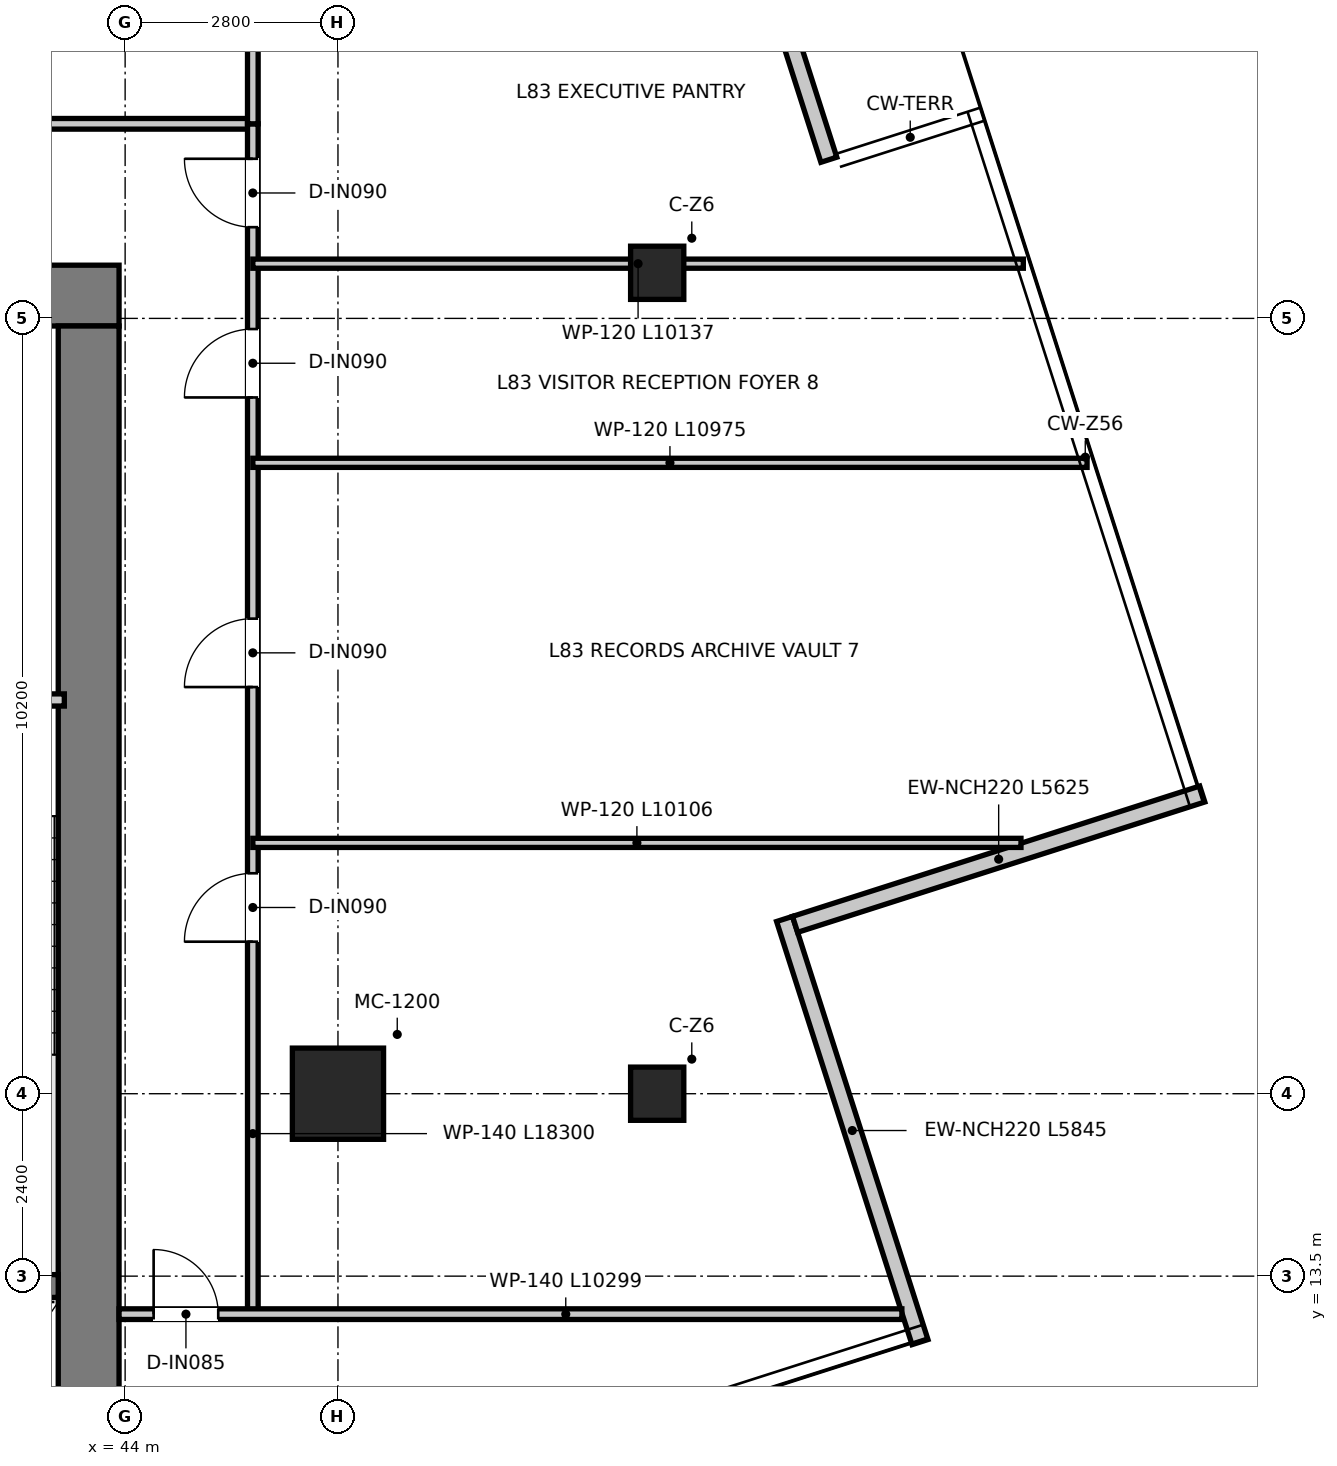
"""IFC4 building model, lengths in metres.
Left out: names, types, materials, properties, quantities, classifications, styles, units other than length and angle.
Written with IfcOpenShell. Run it as: python <this file> out.ifc"""

import sys

from ifc_helpers import new_model, si_unit, direction, frame, frame_2d, origin, origin_2d, place, context, subcontext, project, spatial, rectangle, extrude, source, transform, mapped, element, fill, save


model = new_model("IFC4")
c1 = context("Model", 3, precision=1e-05, world=origin(), true_north=direction((0.0, 1.0)))
c2 = subcontext(c1, "Body", "Model", "MODEL_VIEW")
j1 = project(units=[si_unit("LENGTHUNIT", "METRE"), si_unit("PLANEANGLEUNIT", "RADIAN")], contexts=[c1])
p1 = place(None, origin())
s1 = spatial("IfcSite", under=j1, at=p1, CompositionType="ELEMENT")
p2 = place(p1, origin())
s2 = spatial("IfcBuilding", under=s1, at=p2, CompositionType="ELEMENT")
p3 = place(p2, frame((0.0, 0.0, 339.55)))
s3 = spatial("IfcBuildingStorey", under=s2, at=p3, CompositionType="ELEMENT", Elevation=339.55)
p4 = place(p3, frame((28.08, 26.4, 0.0), z_axis=(0.0, 0.0, 1.0), x_axis=(1.0, 0.0, 0.0)))
e1 = element("IfcWall", 1, at=p4, inside=s3, PredefinedType="SHEAR", context=c2, shape_type="SweptSolid", body=[
    extrude(rectangle(XDim=15.84, YDim=0.8, at=frame_2d((7.92, 0.0))), origin(), (0.0, 0.0, 1.0), 3.95),
])
p5 = place(p4, frame((7.22, 0.0, 0.0)))
e2 = element("IfcOpeningElement", 2, at=p5, cuts=e1, PredefinedType="OPENING", context=c2, shape_type="SweptSolid", body=[
    extrude(rectangle(XDim=1.4, YDim=2.2, at=frame_2d((0.7, 1.1))), frame((0.0, 0.41, 0.0), z_axis=(0.0, -1.0, 0.0), x_axis=(1.0, 0.0, 0.0)), (0.0, 0.0, 1.0), 0.82),
])
p6 = place(p4, frame((1.775, 0.0, 0.0)))
e3 = element("IfcOpeningElement", 3, at=p6, cuts=e1, PredefinedType="OPENING", context=c2, shape_type="SweptSolid", body=[
    extrude(rectangle(XDim=1.05, YDim=2.1, at=frame_2d((0.525, 1.05))), frame((0.0, 0.41, 0.0), z_axis=(0.0, -1.0, 0.0), x_axis=(1.0, 0.0, 0.0)), (0.0, 0.0, 1.0), 0.82),
])
p7 = place(p4, frame((13.015, 0.0, 0.0)))
e4 = element("IfcOpeningElement", 4, at=p7, cuts=e1, PredefinedType="OPENING", context=c2, shape_type="SweptSolid", body=[
    extrude(rectangle(XDim=1.05, YDim=2.1, at=frame_2d((0.525, 1.05))), frame((0.0, 0.41, 0.0), z_axis=(0.0, -1.0, 0.0), x_axis=(1.0, 0.0, 0.0)), (0.0, 0.0, 1.0), 0.82),
])
p8 = place(p3, frame((43.52, 11.3, 0.0), z_axis=(0.0, 0.0, 1.0), x_axis=(0.0, 1.0, 0.0)))
e5 = element("IfcWall", 5, at=p8, inside=s3, PredefinedType="SHEAR", context=c2, shape_type="SweptSolid", body=[
    extrude(rectangle(XDim=14.7, YDim=0.8, at=frame_2d((7.35, 0.0))), origin(), (0.0, 0.0, 1.0), 3.95),
])
p9 = place(p3, frame((40.02, 13.37, 0.0), z_axis=(0.0, 0.0, 1.0), x_axis=(1.0, 0.0, 0.0)))
e6 = element("IfcWall", 6, at=p9, inside=s3, PredefinedType="SHEAR", context=c2, shape_type="SweptSolid", body=[
    extrude(rectangle(XDim=3.1, YDim=0.3, at=frame_2d((1.55, 0.0))), origin(), (0.0, 0.0, 1.0), 3.95),
])
m1 = source(origin(), c2, "Body", "SweptSolid", [
    extrude(rectangle(XDim=1.2, YDim=1.2, at=origin_2d()), origin(), (0.0, 0.0, 1.0), 3.95),
])
p10 = place(p3, frame((46.8, 15.9, 0.0), z_axis=(0.0, 0.0, 1.0), x_axis=(1.0, 0.0, 0.0)))
e7 = element("IfcColumn", 7, at=p10, inside=s3, PredefinedType="USERDEFINED", context=c2, shape_type="MappedRepresentation", body=[
    mapped(m1, transform((0.0, 0.0, 0.0), x_axis=(1.0, 0.0, 0.0), y_axis=(0.0, 1.0, 0.0), z_axis=(0.0, 0.0, 1.0), scale=1.0)),
])
m2 = source(origin(), c2, "Body", "SweptSolid", [
    extrude(rectangle(XDim=0.7, YDim=0.7, at=origin_2d()), origin(), (0.0, 0.0, 1.0), 3.95),
])
for number, where, z_axis, x_axis in (
    (8, (51.0, 26.7, 0.0), (0.0, 0.0, 1.0), (1.0, 0.0, 0.0)),
    (9, (51.0, 15.9, 0.0), (0.0, 0.0, 1.0), (1.0, 0.0, 0.0)),
):
    element("IfcColumn", number, at=place(p3, frame(where, z_axis=z_axis, x_axis=x_axis)), inside=s3, PredefinedType="COLUMN", context=c2, shape_type="MappedRepresentation", body=[
        mapped(m2, transform((0.0, 0.0, 0.0), x_axis=(1.0, 0.0, 0.0), y_axis=(0.0, 1.0, 0.0), z_axis=(0.0, 0.0, 1.0), scale=1.0)),
    ])
p11 = place(p3, frame((54.457, 12.632, 0.0), z_axis=(0.0, 0.0, 1.0), x_axis=(-0.304839382122, 0.952403775248, 0.0)))
e10 = element("IfcWall", 10, at=p11, inside=s3, PredefinedType="ELEMENTEDWALL", context=c2, shape_type="SweptSolid", body=[
    extrude(rectangle(XDim=5.845, YDim=0.22, at=frame_2d((2.922, 0.0))), origin(), (0.0, 0.0, 1.0), 3.67),
])
p12 = place(p3, frame((52.814, 18.128, 0.0), z_axis=(0.0, 0.0, 1.0), x_axis=(0.952395921602, 0.30486391803, 0.0)))
e11 = element("IfcWall", 11, at=p12, inside=s3, PredefinedType="ELEMENTEDWALL", context=c2, shape_type="SweptSolid", body=[
    extrude(rectangle(XDim=5.625, YDim=0.22, at=frame_2d((2.812, 0.0))), origin(), (0.0, 0.0, 1.0), 3.67),
])
p13 = place(p3, frame((50.914, 35.511, 0.0), z_axis=(0.0, 0.0, 1.0), x_axis=(0.304842539612, -0.952402764613, 0.0)))
e12 = element("IfcWall", 12, at=p13, inside=s3, PredefinedType="ELEMENTEDWALL", context=c2, shape_type="SweptSolid", body=[
    extrude(rectangle(XDim=7.69, YDim=0.22, at=frame_2d((3.845, 0.0))), origin(), (0.0, 0.0, 1.0), 3.38),
])
p14 = place(p13, frame((0.937, 0.0, 0.0)))
e13 = element("IfcOpeningElement", 13, at=p14, cuts=e12, PredefinedType="OPENING", context=c2, shape_type="SweptSolid", body=[
    extrude(rectangle(XDim=0.95, YDim=2.1, at=frame_2d((0.475, 1.05))), frame((0.0, 0.12, 0.0), z_axis=(0.0, -1.0, 0.0), x_axis=(1.0, 0.0, 0.0)), (0.0, 0.0, 1.0), 0.24),
])
p15 = place(p3, frame((40.04, 21.08, 0.0), z_axis=(0.0, 0.0, 1.0), x_axis=(1.0, 0.0, 0.0)))
e14 = element("IfcWall", 14, at=p15, inside=s3, PredefinedType="PARTITIONING", context=c2, shape_type="SweptSolid", body=[
    extrude(rectangle(XDim=3.16, YDim=0.16, at=frame_2d((1.58, 0.0))), origin(), (0.0, 0.0, 1.0), 3.67),
])
p16 = place(p15, frame((1.055, 0.0, 0.0)))
e15 = element("IfcOpeningElement", 15, at=p16, cuts=e14, PredefinedType="OPENING", context=c2, shape_type="SweptSolid", body=[
    extrude(rectangle(XDim=1.05, YDim=2.1, at=frame_2d((0.525, 1.05))), frame((0.0, 0.09, 0.0), z_axis=(0.0, -1.0, 0.0), x_axis=(1.0, 0.0, 0.0)), (0.0, 0.0, 1.0), 0.18),
])
p17 = place(p3, frame((26.32, 28.66, 0.0), z_axis=(0.0, 0.0, 1.0), x_axis=(1.0, 0.0, 0.0)))
e16 = element("IfcWall", 16, at=p17, inside=s3, PredefinedType="PARTITIONING", context=c2, shape_type="SweptSolid", body=[
    extrude(rectangle(XDim=19.36, YDim=0.14, at=frame_2d((9.68, 0.0))), origin(), (0.0, 0.0, 1.0), 3.18),
])
p18 = place(p17, frame((1.865, 0.0, 0.0)))
e17 = element("IfcOpeningElement", 17, at=p18, cuts=e16, PredefinedType="OPENING", context=c2, shape_type="SweptSolid", body=[
    extrude(rectangle(XDim=0.95, YDim=2.1, at=frame_2d((0.475, 1.05))), frame((0.0, 0.08, 0.0), z_axis=(0.0, -1.0, 0.0), x_axis=(1.0, 0.0, 0.0)), (0.0, 0.0, 1.0), 0.16),
])
p19 = place(p17, frame((8.205, 0.0, 0.0)))
e18 = element("IfcOpeningElement", 18, at=p19, cuts=e16, PredefinedType="OPENING", context=c2, shape_type="SweptSolid", body=[
    extrude(rectangle(XDim=0.95, YDim=2.1, at=frame_2d((0.475, 1.05))), frame((0.0, 0.08, 0.0), z_axis=(0.0, -1.0, 0.0), x_axis=(1.0, 0.0, 0.0)), (0.0, 0.0, 1.0), 0.16),
])
p20 = place(p17, frame((15.545, 0.0, 0.0)))
e19 = element("IfcOpeningElement", 19, at=p20, cuts=e16, PredefinedType="OPENING", context=c2, shape_type="SweptSolid", body=[
    extrude(rectangle(XDim=0.95, YDim=2.1, at=frame_2d((0.475, 1.05))), frame((0.0, 0.08, 0.0), z_axis=(0.0, -1.0, 0.0), x_axis=(1.0, 0.0, 0.0)), (0.0, 0.0, 1.0), 0.16),
])
p21 = place(p3, frame((45.68, 13.0, 0.0), z_axis=(0.0, 0.0, 1.0), x_axis=(0.0, 1.0, 0.0)))
e20 = element("IfcWall", 20, at=p21, inside=s3, PredefinedType="PARTITIONING", context=c2, shape_type="SweptSolid", body=[
    extrude(rectangle(XDim=15.66, YDim=0.14, at=frame_2d((7.83, 0.0))), origin(), (0.0, 0.0, 1.0), 3.13),
])
p22 = place(p21, frame((14.3, 0.0, 0.0)))
e21 = element("IfcOpeningElement", 21, at=p22, cuts=e20, PredefinedType="OPENING", context=c2, shape_type="SweptSolid", body=[
    extrude(rectangle(XDim=0.9, YDim=2.1, at=frame_2d((0.45, 1.05))), frame((0.0, 0.08, 0.0), z_axis=(0.0, -1.0, 0.0), x_axis=(1.0, 0.0, 0.0)), (0.0, 0.0, 1.0), 0.16),
])
p23 = place(p21, frame((4.9, 0.0, 0.0)))
e22 = element("IfcOpeningElement", 22, at=p23, cuts=e20, PredefinedType="OPENING", context=c2, shape_type="SweptSolid", body=[
    extrude(rectangle(XDim=0.9, YDim=2.1, at=frame_2d((0.45, 1.05))), frame((0.0, 0.08, 0.0), z_axis=(0.0, -1.0, 0.0), x_axis=(1.0, 0.0, 0.0)), (0.0, 0.0, 1.0), 0.16),
])
p24 = place(p21, frame((8.25, 0.0, 0.0)))
e23 = element("IfcOpeningElement", 23, at=p24, cuts=e20, PredefinedType="OPENING", context=c2, shape_type="SweptSolid", body=[
    extrude(rectangle(XDim=0.9, YDim=2.1, at=frame_2d((0.45, 1.05))), frame((0.0, 0.08, 0.0), z_axis=(0.0, -1.0, 0.0), x_axis=(1.0, 0.0, 0.0)), (0.0, 0.0, 1.0), 0.16),
])
p25 = place(p21, frame((12.06, 0.0, 0.0)))
e24 = element("IfcOpeningElement", 24, at=p25, cuts=e20, PredefinedType="OPENING", context=c2, shape_type="SweptSolid", body=[
    extrude(rectangle(XDim=0.9, YDim=2.1, at=frame_2d((0.45, 1.05))), frame((0.0, 0.08, 0.0), z_axis=(0.0, -1.0, 0.0), x_axis=(1.0, 0.0, 0.0)), (0.0, 0.0, 1.0), 0.16),
])
p26 = place(p3, frame((43.92, 13.0, 0.0), z_axis=(0.0, 0.0, 1.0), x_axis=(1.0, 0.0, 0.0)))
e25 = element("IfcWall", 25, at=p26, inside=s3, PredefinedType="PARTITIONING", context=c2, shape_type="SweptSolid", body=[
    extrude(rectangle(XDim=10.299, YDim=0.14, at=frame_2d((5.149, 0.0))), origin(), (0.0, 0.0, 1.0), 3.18),
])
p27 = place(p26, frame((0.455, 0.0, 0.0)))
e26 = element("IfcOpeningElement", 26, at=p27, cuts=e25, PredefinedType="OPENING", context=c2, shape_type="SweptSolid", body=[
    extrude(rectangle(XDim=0.85, YDim=2.1, at=frame_2d((0.425, 1.05))), frame((0.0, 0.08, 0.0), z_axis=(0.0, -1.0, 0.0), x_axis=(1.0, 0.0, 0.0)), (0.0, 0.0, 1.0), 0.16),
])
p28 = place(p3, frame((45.68, 26.82, 0.0), z_axis=(0.0, 0.0, 1.0), x_axis=(1.0, 0.0, 0.0)))
e27 = element("IfcWall", 27, at=p28, inside=s3, PredefinedType="PARTITIONING", context=c2, shape_type="SweptSolid", body=[
    extrude(rectangle(XDim=10.137, YDim=0.12, at=frame_2d((5.068, 0.0))), origin(), (0.0, 0.0, 1.0), 3.13),
])
p29 = place(p3, frame((45.68, 28.66, 0.0), z_axis=(0.0, 0.0, 1.0), x_axis=(0.0, 1.0, 0.0)))
e28 = element("IfcWall", 28, at=p29, inside=s3, PredefinedType="PARTITIONING", context=c2, shape_type="SweptSolid", body=[
    extrude(rectangle(XDim=2.64, YDim=0.14, at=frame_2d((1.32, 0.0))), origin(), (0.0, 0.0, 1.0), 3.43),
])
p30 = place(p3, frame((45.68, 19.2, 0.0), z_axis=(0.0, 0.0, 1.0), x_axis=(1.0, 0.0, 0.0)))
e29 = element("IfcWall", 29, at=p30, inside=s3, PredefinedType="PARTITIONING", context=c2, shape_type="SweptSolid", body=[
    extrude(rectangle(XDim=10.106, YDim=0.12, at=frame_2d((5.053, 0.0))), origin(), (0.0, 0.0, 1.0), 3.13),
])
p31 = place(p3, frame((45.68, 24.2, 0.0), z_axis=(0.0, 0.0, 1.0), x_axis=(1.0, 0.0, 0.0)))
e30 = element("IfcWall", 30, at=p31, inside=s3, PredefinedType="PARTITIONING", context=c2, shape_type="SweptSolid", body=[
    extrude(rectangle(XDim=10.976, YDim=0.12, at=frame_2d((5.488, 0.0))), origin(), (0.0, 0.0, 1.0), 3.13),
])
p32 = place(p22, origin())
e31 = element("IfcDoor", 31, at=p32, inside=s3, OperationType="SINGLE_SWING_RIGHT", PredefinedType="DOOR", context=c2, shape_type="SweptSolid", body=[
    extrude(rectangle(XDim=0.9, YDim=2.1, at=frame_2d((0.45, 1.05))), frame((0.0, 0.025, 0.0), z_axis=(0.0, -1.0, 0.0), x_axis=(1.0, 0.0, 0.0)), (0.0, 0.0, 1.0), 0.05),
])
fill(e21, e31)
p33 = place(p23, origin())
e32 = element("IfcDoor", 32, at=p33, inside=s3, OperationType="SINGLE_SWING_LEFT", PredefinedType="DOOR", context=c2, shape_type="SweptSolid", body=[
    extrude(rectangle(XDim=0.9, YDim=2.1, at=frame_2d((0.45, 1.05))), frame((0.0, 0.025, 0.0), z_axis=(0.0, -1.0, 0.0), x_axis=(1.0, 0.0, 0.0)), (0.0, 0.0, 1.0), 0.05),
])
fill(e22, e32)
p34 = place(p24, origin())
e33 = element("IfcDoor", 33, at=p34, inside=s3, OperationType="SINGLE_SWING_LEFT", PredefinedType="DOOR", context=c2, shape_type="SweptSolid", body=[
    extrude(rectangle(XDim=0.9, YDim=2.1, at=frame_2d((0.45, 1.05))), frame((0.0, 0.025, 0.0), z_axis=(0.0, -1.0, 0.0), x_axis=(1.0, 0.0, 0.0)), (0.0, 0.0, 1.0), 0.05),
])
fill(e23, e33)
p35 = place(p25, origin())
e34 = element("IfcDoor", 34, at=p35, inside=s3, OperationType="SINGLE_SWING_LEFT", PredefinedType="DOOR", context=c2, shape_type="SweptSolid", body=[
    extrude(rectangle(XDim=0.9, YDim=2.1, at=frame_2d((0.45, 1.05))), frame((0.0, 0.025, 0.0), z_axis=(0.0, -1.0, 0.0), x_axis=(1.0, 0.0, 0.0)), (0.0, 0.0, 1.0), 0.05),
])
fill(e24, e34)
p36 = place(p27, origin())
e35 = element("IfcDoor", 35, at=p36, inside=s3, OperationType="SINGLE_SWING_LEFT", PredefinedType="DOOR", context=c2, shape_type="SweptSolid", body=[
    extrude(rectangle(XDim=0.85, YDim=2.1, at=frame_2d((0.425, 1.05))), frame((0.0, 0.025, 0.0), z_axis=(0.0, -1.0, 0.0), x_axis=(1.0, 0.0, 0.0)), (0.0, 0.0, 1.0), 0.05),
])
fill(e26, e35)
save(model, sys.argv[1])
